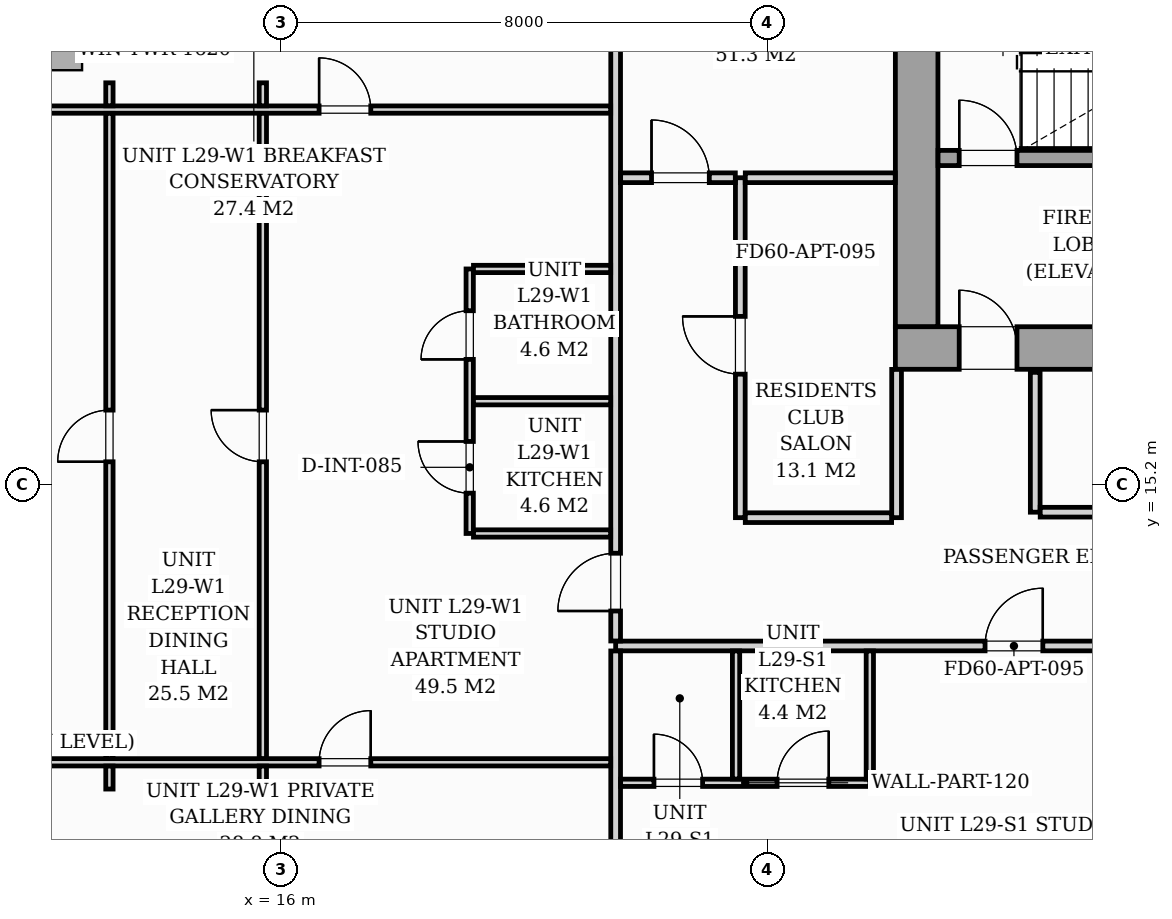
"""IFC4 building model, lengths in metres.
Left out: names, types, materials, properties, quantities, classifications, styles, units other than length and angle.
Written with IfcOpenShell. Run it as: python <this file> out.ifc"""

import sys

from ifc_helpers import new_model, si_unit, direction, frame, frame_2d, origin, origin_2d, place, context, subcontext, project, spatial, rectangle, i_section, extrude, source, transform, mapped, element, fill, save


model = new_model("IFC4")
c1 = context("Model", 3, precision=1e-05, world=origin(), true_north=direction((0.0, 1.0)))
c2 = subcontext(c1, "Body", "Model", "MODEL_VIEW")
j1 = project(units=[si_unit("LENGTHUNIT", "METRE"), si_unit("PLANEANGLEUNIT", "RADIAN")], contexts=[c1])
p1 = place(None, origin())
s1 = spatial("IfcSite", under=j1, at=p1, CompositionType="ELEMENT")
p2 = place(p1, origin())
s2 = spatial("IfcBuilding", under=s1, at=p2, CompositionType="ELEMENT")
p3 = place(p2, frame((0.0, 0.0, 103.4)))
s3 = spatial("IfcBuildingStorey", under=s2, at=p3, CompositionType="ELEMENT", Elevation=103.4)
m1 = source(origin(), c2, "Body", "SweptSolid", [
    extrude(i_section(OverallWidth=0.427, OverallDepth=0.483, WebThickness=0.051, FlangeThickness=0.082, FilletRadius=0.018, at=origin_2d()), origin(), (0.0, 0.0, 1.0), 3.196),
])
p4 = place(p3, frame((26.4, 17.4, 0.002), z_axis=(0.0, 0.0, 1.0), x_axis=(1.0, 0.0, 0.0)))
e1 = element("IfcColumn", 1, at=p4, inside=s3, PredefinedType="PILASTER", context=c2, shape_type="MappedRepresentation", body=[
    mapped(m1, transform((0.0, 0.0, 0.0), scale=1.0)),
])
m2 = source(origin(), c2, "Body", "SweptSolid", [
    extrude(rectangle(XDim=0.9, YDim=1.1, at=origin_2d()), origin(), (0.0, 0.0, 1.0), 3.196),
])
p5 = place(p3, frame((12.275, 22.568, 0.002), z_axis=(0.0, 0.0, 1.0), x_axis=(0.995396198367, 0.09584575252, 0.0)))
e2 = element("IfcColumn", 2, at=p5, inside=s3, PredefinedType="COLUMN", context=c2, shape_type="MappedRepresentation", body=[
    mapped(m2, transform((0.0, 0.0, 0.0), scale=1.0)),
])
p6 = place(p3, frame((26.1, 17.45, 0.0), z_axis=(0.0, 0.0, 1.0), x_axis=(1.0, 0.0, 0.0)))
e3 = element("IfcWall", 3, at=p6, inside=s3, PredefinedType="SHEAR", context=c2, shape_type="SweptSolid", body=[
    extrude(rectangle(XDim=19.8, YDim=0.7, at=frame_2d((9.9, 0.0))), origin(), (0.0, 0.0, 1.0), 3.2),
])
p7 = place(p6, frame((1.05, 0.0, 0.0)))
e4 = element("IfcOpeningElement", 4, at=p7, cuts=e3, PredefinedType="OPENING", context=c2, shape_type="SweptSolid", body=[
    extrude(rectangle(XDim=0.95, YDim=2.06, at=frame_2d((0.475, 1.03))), frame((0.0, 0.36, 0.0), z_axis=(0.0, -1.0, 0.0), x_axis=(1.0, 0.0, 0.0)), (0.0, 0.0, 1.0), 0.72),
])
p8 = place(p6, frame((9.48, 0.0, 0.0)))
e5 = element("IfcOpeningElement", 5, at=p8, cuts=e3, PredefinedType="OPENING", context=c2, shape_type="SweptSolid", body=[
    extrude(rectangle(XDim=0.85, YDim=2.0, at=frame_2d((0.425, 1.0))), frame((0.0, 0.36, 0.0), z_axis=(0.0, -1.0, 0.0), x_axis=(1.0, 0.0, 0.0)), (0.0, 0.0, 1.0), 0.72),
])
p9 = place(p6, frame((17.65, 0.0, 0.0)))
e6 = element("IfcOpeningElement", 6, at=p9, cuts=e3, PredefinedType="OPENING", context=c2, shape_type="SweptSolid", body=[
    extrude(rectangle(XDim=0.95, YDim=2.06, at=frame_2d((0.475, 1.03))), frame((0.0, 0.36, 0.0), z_axis=(0.0, -1.0, 0.0), x_axis=(1.0, 0.0, 0.0)), (0.0, 0.0, 1.0), 0.72),
])
p10 = place(p3, frame((26.45, 17.802, 0.0), z_axis=(0.0, 0.0, 1.0), x_axis=(0.0, 1.0, 0.0)))
e7 = element("IfcWall", 7, at=p10, inside=s3, PredefinedType="SHEAR", context=c2, shape_type="SweptSolid", body=[
    extrude(rectangle(XDim=5.796, YDim=0.7, at=frame_2d((2.898, 0.0))), origin(), (0.0, 0.0, 1.0), 3.2),
])
p11 = place(p3, frame((26.802, 20.575, 0.0), z_axis=(0.0, 0.0, 1.0), x_axis=(1.0, 0.0, 0.0)))
e8 = element("IfcWall", 8, at=p11, inside=s3, PredefinedType="SOLIDWALL", context=c2, shape_type="SweptSolid", body=[
    extrude(rectangle(XDim=8.148, YDim=0.25, at=frame_2d((4.074, 0.0))), origin(), (0.0, 0.0, 1.0), 3.2),
])
p12 = place(p11, frame((0.348, 0.0, 0.0)))
e9 = element("IfcOpeningElement", 9, at=p12, cuts=e8, PredefinedType="OPENING", context=c2, shape_type="SweptSolid", body=[
    extrude(rectangle(XDim=0.95, YDim=2.06, at=frame_2d((0.475, 1.03))), frame((0.0, 0.135, 0.0), z_axis=(0.0, -1.0, 0.0), x_axis=(1.0, 0.0, 0.0)), (0.0, 0.0, 1.0), 0.27),
])
p13 = place(p3, frame((28.4, 14.75, 0.0), z_axis=(0.0, 0.0, 1.0), x_axis=(0.0, 1.0, 0.0)))
e10 = element("IfcWall", 10, at=p13, inside=s3, PredefinedType="PARTITIONING", context=c2, shape_type="SweptSolid", body=[
    extrude(rectangle(XDim=2.3, YDim=0.16, at=frame_2d((1.15, 0.0))), origin(), (0.0, 0.0, 1.0), 2.94),
])
p14 = place(p3, frame((28.482, 14.75, 0.0), z_axis=(0.0, 0.0, 1.0), x_axis=(1.0, 0.0, 0.0)))
e11 = element("IfcWall", 11, at=p14, inside=s3, PredefinedType="PARTITIONING", context=c2, shape_type="SweptSolid", body=[
    extrude(rectangle(XDim=4.516, YDim=0.16, at=frame_2d((2.258, 0.0))), origin(), (0.0, 0.0, 1.0), 2.94),
])
p15 = place(p14, frame((1.868, 0.0, 0.0)))
e12 = element("IfcOpeningElement", 12, at=p15, cuts=e11, PredefinedType="OPENING", context=c2, shape_type="SweptSolid", body=[
    extrude(rectangle(XDim=0.8, YDim=2.05, at=frame_2d((0.4, 1.025))), frame((0.0, 0.09, 0.0), z_axis=(0.0, -1.0, 0.0), x_axis=(1.0, 0.0, 0.0)), (0.0, 0.0, 1.0), 0.18),
])
p16 = place(p3, frame((21.5, 12.55, 0.0), z_axis=(0.0, 0.0, 1.0), x_axis=(1.0, 0.0, 0.0)))
e13 = element("IfcWall", 13, at=p16, inside=s3, PredefinedType="PARTITIONING", context=c2, shape_type="SweptSolid", body=[
    extrude(rectangle(XDim=24.38, YDim=0.16, at=frame_2d((12.19, 0.0))), origin(), (0.0, 0.0, 1.0), 2.94),
])
p17 = place(p16, frame((6.075, 0.0, 0.0)))
e14 = element("IfcOpeningElement", 14, at=p17, cuts=e13, PredefinedType="OPENING", context=c2, shape_type="SweptSolid", body=[
    extrude(rectangle(XDim=0.95, YDim=2.06, at=frame_2d((0.475, 1.03))), frame((0.0, 0.09, 0.0), z_axis=(0.0, -1.0, 0.0), x_axis=(1.0, 0.0, 0.0)), (0.0, 0.0, 1.0), 0.18),
])
p18 = place(p16, frame((10.519, 0.0, 0.0)))
e15 = element("IfcOpeningElement", 15, at=p18, cuts=e13, PredefinedType="OPENING", context=c2, shape_type="SweptSolid", body=[
    extrude(rectangle(XDim=0.95, YDim=2.06, at=frame_2d((0.475, 1.03))), frame((0.0, 0.09, 0.0), z_axis=(0.0, -1.0, 0.0), x_axis=(1.0, 0.0, 0.0)), (0.0, 0.0, 1.0), 0.18),
])
p19 = place(p16, frame((18.208, 0.0, 0.0)))
e16 = element("IfcOpeningElement", 16, at=p19, cuts=e13, PredefinedType="OPENING", context=c2, shape_type="SweptSolid", body=[
    extrude(rectangle(XDim=0.95, YDim=2.06, at=frame_2d((0.475, 1.03))), frame((0.0, 0.09, 0.0), z_axis=(0.0, -1.0, 0.0), x_axis=(1.0, 0.0, 0.0)), (0.0, 0.0, 1.0), 0.18),
])
p20 = place(p3, frame((21.5, 4.812, 0.0), z_axis=(0.0, 0.0, 1.0), x_axis=(0.0, 1.0, 0.0)))
e17 = element("IfcWall", 17, at=p20, inside=s3, PredefinedType="PARTITIONING", context=c2, shape_type="SweptSolid", body=[
    extrude(rectangle(XDim=7.656, YDim=0.16, at=frame_2d((3.828, 0.0))), origin(), (0.0, 0.0, 1.0), 2.94),
])
p21 = place(p3, frame((21.5, 12.632, 0.0), z_axis=(0.0, 0.0, 1.0), x_axis=(0.0, 1.0, 0.0)))
e18 = element("IfcWall", 18, at=p21, inside=s3, PredefinedType="PARTITIONING", context=c2, shape_type="SweptSolid", body=[
    extrude(rectangle(XDim=11.747, YDim=0.16, at=frame_2d((5.873, 0.0))), origin(), (0.0, 0.0, 1.0), 2.94),
])
p22 = place(p21, frame((0.493, 0.0, 0.0)))
e19 = element("IfcOpeningElement", 19, at=p22, cuts=e18, PredefinedType="OPENING", context=c2, shape_type="SweptSolid", body=[
    extrude(rectangle(XDim=0.95, YDim=2.06, at=frame_2d((0.475, 1.03))), frame((0.0, 0.09, 0.0), z_axis=(0.0, -1.0, 0.0), x_axis=(1.0, 0.0, 0.0)), (0.0, 0.0, 1.0), 0.18),
])
p23 = place(p3, frame((21.582, 10.3, 0.0), z_axis=(0.0, 0.0, 1.0), x_axis=(1.0, 0.0, 0.0)))
e20 = element("IfcWall", 20, at=p23, inside=s3, PredefinedType="PARTITIONING", context=c2, shape_type="SweptSolid", body=[
    extrude(rectangle(XDim=4.098, YDim=0.12, at=frame_2d((2.049, 0.0))), origin(), (0.0, 0.0, 1.0), 2.94),
])
p24 = place(p23, frame((0.548, 0.0, 0.0)))
e21 = element("IfcOpeningElement", 21, at=p24, cuts=e20, PredefinedType="OPENING", context=c2, shape_type="SweptSolid", body=[
    extrude(rectangle(XDim=0.8, YDim=2.02, at=frame_2d((0.4, 1.01))), frame((0.0, 0.07, 0.0), z_axis=(0.0, -1.0, 0.0), x_axis=(1.0, 0.0, 0.0)), (0.0, 0.0, 1.0), 0.14),
])
p25 = place(p23, frame((2.573, 0.0, 0.0)))
e22 = element("IfcOpeningElement", 22, at=p25, cuts=e20, PredefinedType="OPENING", context=c2, shape_type="SweptSolid", body=[
    extrude(rectangle(XDim=0.85, YDim=2.05, at=frame_2d((0.425, 1.025))), frame((0.0, 0.07, 0.0), z_axis=(0.0, -1.0, 0.0), x_axis=(1.0, 0.0, 0.0)), (0.0, 0.0, 1.0), 0.14),
])
for number, where, z_axis, x_axis in (
    (23, (25.68, 10.362, 0.0), (0.0, 0.0, 1.0), (0.0, 1.0, 0.0)),
    (24, (23.48, 10.362, 0.0), (0.0, 0.0, 1.0), (0.0, 1.0, 0.0)),
):
    element("IfcWall", number, at=place(p3, frame(where, z_axis=z_axis, x_axis=x_axis)), inside=s3, PredefinedType="PARTITIONING", context=c2, shape_type="SweptSolid", body=[
        extrude(rectangle(XDim=2.106, YDim=0.12, at=frame_2d((1.053, 0.0))), origin(), (0.0, 0.0, 1.0), 2.94),
    ])
p26 = place(p3, frame((19.1, 14.4, 0.0), z_axis=(0.0, 0.0, 1.0), x_axis=(0.0, 1.0, 0.0)))
e25 = element("IfcWall", 25, at=p26, inside=s3, PredefinedType="PARTITIONING", context=c2, shape_type="SweptSolid", body=[
    extrude(rectangle(XDim=4.35, YDim=0.12, at=frame_2d((2.175, 0.0))), origin(), (0.0, 0.0, 1.0), 2.94),
])
p27 = place(p26, frame((0.663, 0.0, 0.0)))
e26 = element("IfcOpeningElement", 26, at=p27, cuts=e25, PredefinedType="OPENING", context=c2, shape_type="SweptSolid", body=[
    extrude(rectangle(XDim=0.85, YDim=2.05, at=frame_2d((0.425, 1.025))), frame((0.0, 0.07, 0.0), z_axis=(0.0, -1.0, 0.0), x_axis=(1.0, 0.0, 0.0)), (0.0, 0.0, 1.0), 0.14),
])
p28 = place(p26, frame((2.863, 0.0, 0.0)))
e27 = element("IfcOpeningElement", 27, at=p28, cuts=e25, PredefinedType="OPENING", context=c2, shape_type="SweptSolid", body=[
    extrude(rectangle(XDim=0.8, YDim=2.02, at=frame_2d((0.4, 1.01))), frame((0.0, 0.07, 0.0), z_axis=(0.0, -1.0, 0.0), x_axis=(1.0, 0.0, 0.0)), (0.0, 0.0, 1.0), 0.14),
])
for number, where, z_axis, x_axis in (
    (28, (19.162, 16.575, 0.0), (0.0, 0.0, 1.0), (1.0, 0.0, 0.0)),
    (29, (19.162, 14.4, 0.0), (0.0, 0.0, 1.0), (1.0, 0.0, 0.0)),
    (30, (19.162, 18.75, 0.0), (0.0, 0.0, 1.0), (1.0, 0.0, 0.0)),
):
    element("IfcWall", number, at=place(p3, frame(where, z_axis=z_axis, x_axis=x_axis)), inside=s3, PredefinedType="PARTITIONING", context=c2, shape_type="SweptSolid", body=[
        extrude(rectangle(XDim=2.256, YDim=0.12, at=frame_2d((1.128, 0.0))), origin(), (0.0, 0.0, 1.0), 2.94),
    ])
p29 = place(p3, frame((10.293, 21.371, 0.0), z_axis=(0.0, 0.0, 1.0), x_axis=(1.0, 0.0, 0.0)))
e31 = element("IfcWall", 31, at=p29, inside=s3, PredefinedType="PARTITIONING", context=c2, shape_type="SweptSolid", body=[
    extrude(rectangle(XDim=11.125, YDim=0.12, at=frame_2d((5.562, 0.0))), origin(), (0.0, 0.0, 1.0), 2.94),
])
p30 = place(p29, frame((6.33, 0.0, 0.0)))
e32 = element("IfcOpeningElement", 32, at=p30, cuts=e31, PredefinedType="OPENING", context=c2, shape_type="SweptSolid", body=[
    extrude(rectangle(XDim=0.85, YDim=2.05, at=frame_2d((0.425, 1.025))), frame((0.0, 0.07, 0.0), z_axis=(0.0, -1.0, 0.0), x_axis=(1.0, 0.0, 0.0)), (0.0, 0.0, 1.0), 0.14),
])
p31 = place(p3, frame((9.888, 10.637, 0.0), z_axis=(0.0, 0.0, 1.0), x_axis=(1.0, 0.0, 0.0)))
e33 = element("IfcWall", 33, at=p31, inside=s3, PredefinedType="PARTITIONING", context=c2, shape_type="SweptSolid", body=[
    extrude(rectangle(XDim=11.53, YDim=0.12, at=frame_2d((5.765, 0.0))), origin(), (0.0, 0.0, 1.0), 2.94),
])
p32 = place(p31, frame((6.735, 0.0, 0.0)))
e34 = element("IfcOpeningElement", 34, at=p32, cuts=e33, PredefinedType="OPENING", context=c2, shape_type="SweptSolid", body=[
    extrude(rectangle(XDim=0.85, YDim=2.05, at=frame_2d((0.425, 1.025))), frame((0.0, 0.07, 0.0), z_axis=(0.0, -1.0, 0.0), x_axis=(1.0, 0.0, 0.0)), (0.0, 0.0, 1.0), 0.14),
])
p33 = place(p3, frame((13.175, 10.197, 0.0), z_axis=(0.0, 0.0, 1.0), x_axis=(0.0, 1.0, 0.0)))
e35 = element("IfcWall", 35, at=p33, inside=s3, PredefinedType="PARTITIONING", context=c2, shape_type="SweptSolid", body=[
    extrude(rectangle(XDim=0.378, YDim=0.12, at=frame_2d((0.189, 0.0))), origin(), (0.0, 0.0, 1.0), 2.94),
])
p34 = place(p3, frame((13.175, 10.699, 0.0), z_axis=(0.0, 0.0, 1.0), x_axis=(0.0, 1.0, 0.0)))
e36 = element("IfcWall", 36, at=p34, inside=s3, PredefinedType="PARTITIONING", context=c2, shape_type="SweptSolid", body=[
    extrude(rectangle(XDim=10.61, YDim=0.12, at=frame_2d((5.305, 0.0))), origin(), (0.0, 0.0, 1.0), 2.94),
])
p35 = place(p34, frame((4.88, 0.0, 0.0)))
e37 = element("IfcOpeningElement", 37, at=p35, cuts=e36, PredefinedType="OPENING", context=c2, shape_type="SweptSolid", body=[
    extrude(rectangle(XDim=0.85, YDim=2.05, at=frame_2d((0.425, 1.025))), frame((0.0, 0.07, 0.0), z_axis=(0.0, -1.0, 0.0), x_axis=(1.0, 0.0, 0.0)), (0.0, 0.0, 1.0), 0.14),
])
for number, where, z_axis, x_axis in (
    (38, (13.175, 21.433, 0.0), (0.0, 0.0, 1.0), (0.0, 1.0, 0.0)),
    (39, (15.698, 10.197, 0.0), (0.0, 0.0, 1.0), (0.0, 1.0, 0.0)),
):
    element("IfcWall", number, at=place(p3, frame(where, z_axis=z_axis, x_axis=x_axis)), inside=s3, PredefinedType="PARTITIONING", context=c2, shape_type="SweptSolid", body=[
        extrude(rectangle(XDim=0.378, YDim=0.12, at=frame_2d((0.189, 0.0))), origin(), (0.0, 0.0, 1.0), 2.94),
    ])
p36 = place(p3, frame((15.698, 10.699, 0.0), z_axis=(0.0, 0.0, 1.0), x_axis=(0.0, 1.0, 0.0)))
e40 = element("IfcWall", 40, at=p36, inside=s3, PredefinedType="PARTITIONING", context=c2, shape_type="SweptSolid", body=[
    extrude(rectangle(XDim=10.61, YDim=0.12, at=frame_2d((5.305, 0.0))), origin(), (0.0, 0.0, 1.0), 2.94),
])
p37 = place(p36, frame((4.88, 0.0, 0.0)))
e41 = element("IfcOpeningElement", 41, at=p37, cuts=e40, PredefinedType="OPENING", context=c2, shape_type="SweptSolid", body=[
    extrude(rectangle(XDim=0.85, YDim=2.05, at=frame_2d((0.425, 1.025))), frame((0.0, 0.07, 0.0), z_axis=(0.0, -1.0, 0.0), x_axis=(1.0, 0.0, 0.0)), (0.0, 0.0, 1.0), 0.14),
])
p38 = place(p3, frame((15.698, 21.433, 0.0), z_axis=(0.0, 0.0, 1.0), x_axis=(0.0, 1.0, 0.0)))
e42 = element("IfcWall", 42, at=p38, inside=s3, PredefinedType="PARTITIONING", context=c2, shape_type="SweptSolid", body=[
    extrude(rectangle(XDim=0.378, YDim=0.12, at=frame_2d((0.189, 0.0))), origin(), (0.0, 0.0, 1.0), 2.94),
])
p39 = place(p3, frame((23.55, 14.66, 0.0), z_axis=(0.0, 0.0, 1.0), x_axis=(0.0, 1.0, 0.0)))
e43 = element("IfcWall", 43, at=p39, inside=s3, PredefinedType="PARTITIONING", context=c2, shape_type="SweptSolid", body=[
    extrude(rectangle(XDim=5.59, YDim=0.16, at=frame_2d((2.795, 0.0))), origin(), (0.0, 0.0, 1.0), 2.94),
])
p40 = place(p39, frame((2.36, 0.0, 0.0)))
e44 = element("IfcOpeningElement", 44, at=p40, cuts=e43, PredefinedType="OPENING", context=c2, shape_type="SweptSolid", body=[
    extrude(rectangle(XDim=0.95, YDim=2.06, at=frame_2d((0.475, 1.03))), frame((0.0, 0.09, 0.0), z_axis=(0.0, -1.0, 0.0), x_axis=(1.0, 0.0, 0.0)), (0.0, 0.0, 1.0), 0.18),
])
p41 = place(p3, frame((21.582, 20.25, 0.0), z_axis=(0.0, 0.0, 1.0), x_axis=(1.0, 0.0, 0.0)))
e45 = element("IfcWall", 45, at=p41, inside=s3, PredefinedType="PARTITIONING", context=c2, shape_type="SweptSolid", body=[
    extrude(rectangle(XDim=1.886, YDim=0.16, at=frame_2d((0.943, 0.0))), origin(), (0.0, 0.0, 1.0), 2.94),
])
p42 = place(p41, frame((0.508, 0.0, 0.0)))
e46 = element("IfcOpeningElement", 46, at=p42, cuts=e45, PredefinedType="OPENING", context=c2, shape_type="SweptSolid", body=[
    extrude(rectangle(XDim=0.95, YDim=2.06, at=frame_2d((0.475, 1.03))), frame((0.0, 0.09, 0.0), z_axis=(0.0, -1.0, 0.0), x_axis=(1.0, 0.0, 0.0)), (0.0, 0.0, 1.0), 0.18),
])
p43 = place(p3, frame((23.632, 20.25, 0.0), z_axis=(0.0, 0.0, 1.0), x_axis=(1.0, 0.0, 0.0)))
e47 = element("IfcWall", 47, at=p43, inside=s3, PredefinedType="PARTITIONING", context=c2, shape_type="SweptSolid", body=[
    extrude(rectangle(XDim=2.466, YDim=0.16, at=frame_2d((1.233, 0.0))), origin(), (0.0, 0.0, 1.0), 2.94),
])
p44 = place(p3, frame((26.12, 14.66, 0.0), z_axis=(0.0, 0.0, 1.0), x_axis=(0.0, 1.0, 0.0)))
e48 = element("IfcWall", 48, at=p44, inside=s3, PredefinedType="PARTITIONING", context=c2, shape_type="SweptSolid", body=[
    extrude(rectangle(XDim=2.438, YDim=0.16, at=frame_2d((1.219, 0.0))), origin(), (0.0, 0.0, 1.0), 2.94),
])
p45 = place(p3, frame((23.632, 14.66, 0.0), z_axis=(0.0, 0.0, 1.0), x_axis=(1.0, 0.0, 0.0)))
e49 = element("IfcWall", 49, at=p45, inside=s3, PredefinedType="PARTITIONING", context=c2, shape_type="SweptSolid", body=[
    extrude(rectangle(XDim=2.406, YDim=0.16, at=frame_2d((1.203, 0.0))), origin(), (0.0, 0.0, 1.0), 2.94),
])
m3 = source(origin(), c2, "Body", "SweptSolid", [
    extrude(rectangle(XDim=0.95, YDim=2.06, at=frame_2d((0.475, 1.03))), frame((0.0, 0.025, 0.0), z_axis=(0.0, -1.0, 0.0), x_axis=(1.0, 0.0, 0.0)), (0.0, 0.0, 1.0), 0.05),
])
p46 = place(p7, origin())
e50 = element("IfcDoor", 50, at=p46, inside=s3, OperationType="SINGLE_SWING_LEFT", PredefinedType="DOOR", context=c2, shape_type="MappedRepresentation", body=[
    mapped(m3, transform((0.0, 0.0, 0.0), scale=1.0)),
])
fill(e4, e50)
p47 = place(p12, origin())
e51 = element("IfcDoor", 51, at=p47, inside=s3, OperationType="SINGLE_SWING_LEFT", PredefinedType="DOOR", context=c2, shape_type="MappedRepresentation", body=[
    mapped(m3, transform((0.0, 0.0, 0.0), scale=1.0)),
])
fill(e9, e51)
m4 = source(origin(), c2, "Body", "SweptSolid", [
    extrude(rectangle(XDim=0.95, YDim=2.06, at=frame_2d((0.475, 1.03))), frame((0.0, 0.025, 0.0), z_axis=(0.0, -1.0, 0.0), x_axis=(1.0, 0.0, 0.0)), (0.0, 0.0, 1.0), 0.05),
])
p48 = place(p17, origin())
e52 = element("IfcDoor", 52, at=p48, inside=s3, OperationType="SINGLE_SWING_RIGHT", PredefinedType="DOOR", context=c2, shape_type="MappedRepresentation", body=[
    mapped(m4, transform((0.0, 0.0, 0.0), scale=1.0)),
])
fill(e14, e52)
m5 = source(origin(), c2, "Body", "SweptSolid", [
    extrude(rectangle(XDim=0.8, YDim=2.02, at=frame_2d((0.4, 1.01))), frame((0.0, 0.025, 0.0), z_axis=(0.0, -1.0, 0.0), x_axis=(1.0, 0.0, 0.0)), (0.0, 0.0, 1.0), 0.05),
])
p49 = place(p24, origin())
e53 = element("IfcDoor", 53, at=p49, inside=s3, OperationType="SINGLE_SWING_LEFT", PredefinedType="DOOR", context=c2, shape_type="MappedRepresentation", body=[
    mapped(m5, transform((0.0, 0.0, 0.0), scale=1.0)),
])
fill(e21, e53)
m6 = source(origin(), c2, "Body", "SweptSolid", [
    extrude(rectangle(XDim=0.85, YDim=2.05, at=frame_2d((0.425, 1.025))), frame((0.0, 0.025, 0.0), z_axis=(0.0, -1.0, 0.0), x_axis=(1.0, 0.0, 0.0)), (0.0, 0.0, 1.0), 0.05),
])
p50 = place(p25, origin())
e54 = element("IfcDoor", 54, at=p50, inside=s3, OperationType="SINGLE_SWING_RIGHT", PredefinedType="DOOR", context=c2, shape_type="MappedRepresentation", body=[
    mapped(m6, transform((0.0, 0.0, 0.0), scale=1.0)),
])
fill(e22, e54)
p51 = place(p22, origin())
e55 = element("IfcDoor", 55, at=p51, inside=s3, OperationType="SINGLE_SWING_LEFT", PredefinedType="DOOR", context=c2, shape_type="MappedRepresentation", body=[
    mapped(m4, transform((0.0, 0.0, 0.0), scale=1.0)),
])
fill(e19, e55)
p52 = place(p27, origin())
e56 = element("IfcDoor", 56, at=p52, inside=s3, OperationType="SINGLE_SWING_RIGHT", PredefinedType="DOOR", context=c2, shape_type="MappedRepresentation", body=[
    mapped(m6, transform((0.0, 0.0, 0.0), scale=1.0)),
])
fill(e26, e56)
p53 = place(p28, origin())
e57 = element("IfcDoor", 57, at=p53, inside=s3, OperationType="SINGLE_SWING_LEFT", PredefinedType="DOOR", context=c2, shape_type="MappedRepresentation", body=[
    mapped(m5, transform((0.0, 0.0, 0.0), scale=1.0)),
])
fill(e27, e57)
p54 = place(p30, origin())
e58 = element("IfcDoor", 58, at=p54, inside=s3, OperationType="SINGLE_SWING_LEFT", PredefinedType="DOOR", context=c2, shape_type="MappedRepresentation", body=[
    mapped(m6, transform((0.0, 0.0, 0.0), scale=1.0)),
])
fill(e32, e58)
p55 = place(p32, origin())
e59 = element("IfcDoor", 59, at=p55, inside=s3, OperationType="SINGLE_SWING_RIGHT", PredefinedType="DOOR", context=c2, shape_type="MappedRepresentation", body=[
    mapped(m6, transform((0.0, 0.0, 0.0), scale=1.0)),
])
fill(e34, e59)
p56 = place(p35, origin())
e60 = element("IfcDoor", 60, at=p56, inside=s3, OperationType="SINGLE_SWING_LEFT", PredefinedType="DOOR", context=c2, shape_type="MappedRepresentation", body=[
    mapped(m6, transform((0.0, 0.0, 0.0), scale=1.0)),
])
fill(e37, e60)
p57 = place(p37, origin())
e61 = element("IfcDoor", 61, at=p57, inside=s3, OperationType="SINGLE_SWING_RIGHT", PredefinedType="DOOR", context=c2, shape_type="MappedRepresentation", body=[
    mapped(m6, transform((0.0, 0.0, 0.0), scale=1.0)),
])
fill(e41, e61)
p58 = place(p40, origin())
e62 = element("IfcDoor", 62, at=p58, inside=s3, OperationType="SINGLE_SWING_RIGHT", PredefinedType="DOOR", context=c2, shape_type="MappedRepresentation", body=[
    mapped(m4, transform((0.0, 0.0, 0.0), scale=1.0)),
])
fill(e44, e62)
p59 = place(p42, origin())
e63 = element("IfcDoor", 63, at=p59, inside=s3, OperationType="SINGLE_SWING_LEFT", PredefinedType="DOOR", context=c2, shape_type="MappedRepresentation", body=[
    mapped(m4, transform((0.0, 0.0, 0.0), scale=1.0)),
])
fill(e46, e63)
save(model, sys.argv[1])
